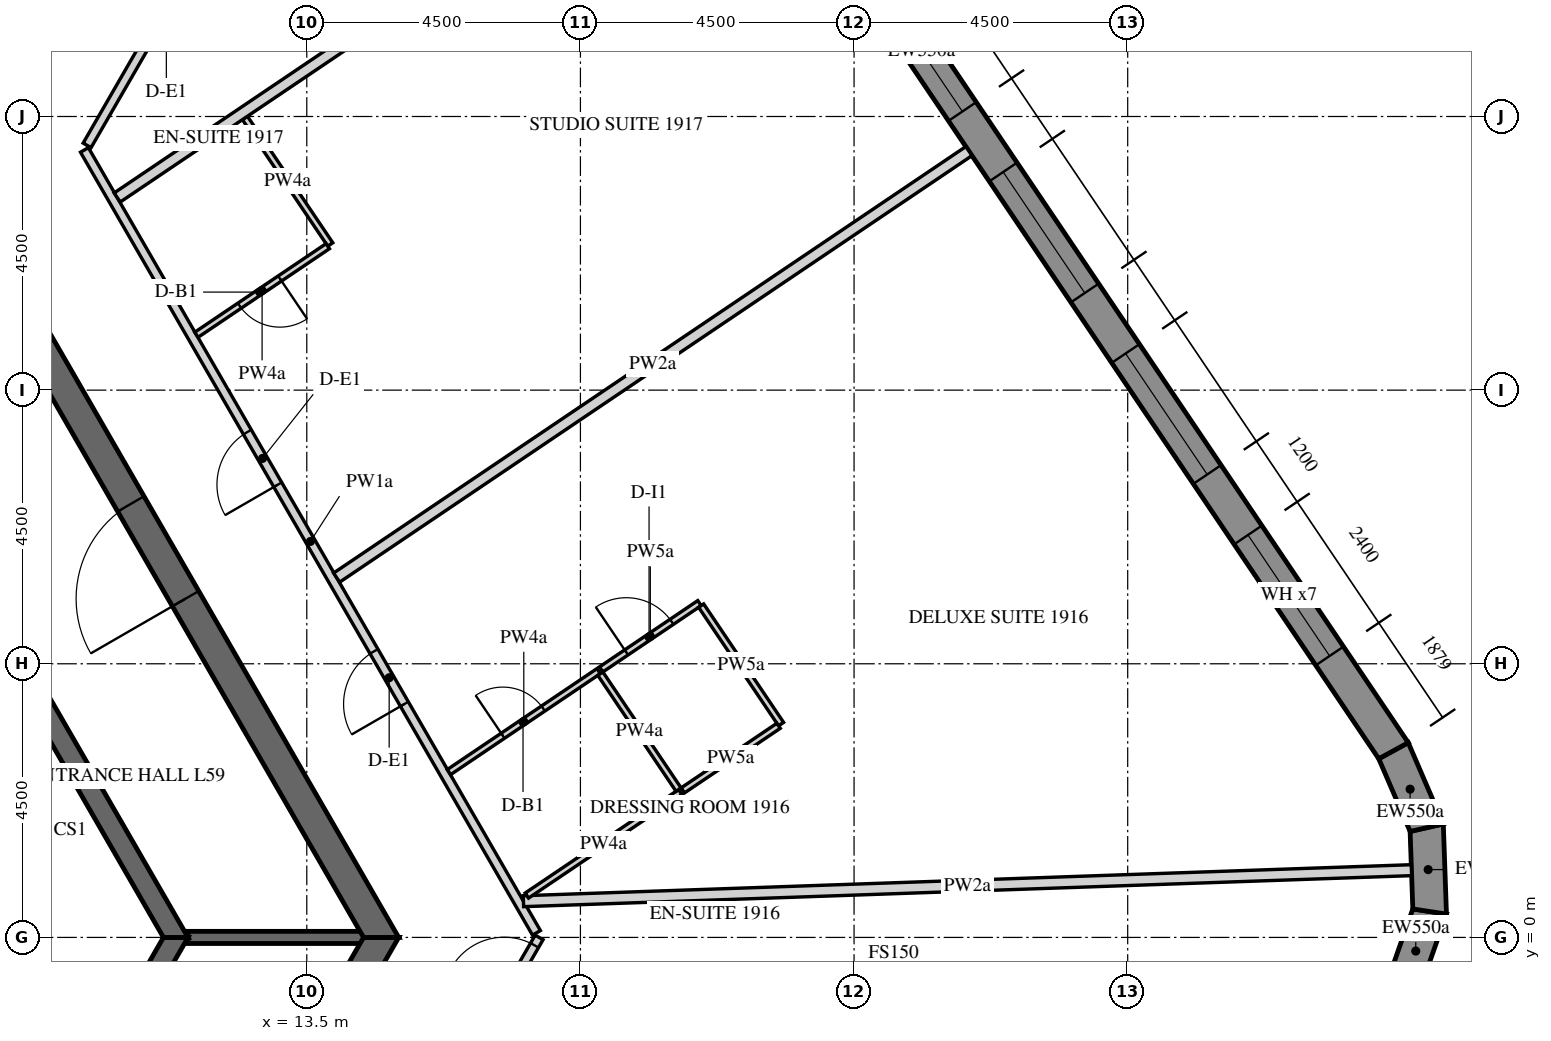
"""IFC4 building model, lengths in metres.
Left out: names, types, materials, properties, quantities, classifications, styles, units other than length and angle.
Written with IfcOpenShell. Run it as: python <this file> out.ifc"""

import sys

from ifc_helpers import new_model, si_unit, direction, frame, frame_2d, origin, place, context, subcontext, project, spatial, polyline, rectangle, outline, extrude, element, fill, save


model = new_model("IFC4")
c1 = context("Model", 3, precision=1e-05, world=origin(), true_north=direction((0.0, 1.0)))
c2 = subcontext(c1, "Body", "Model", "MODEL_VIEW")
j1 = project(units=[si_unit("LENGTHUNIT", "METRE"), si_unit("PLANEANGLEUNIT", "RADIAN")], contexts=[c1])
p1 = place(None, origin())
s1 = spatial("IfcSite", under=j1, at=p1, CompositionType="ELEMENT")
p2 = place(p1, origin())
s2 = spatial("IfcBuilding", under=s1, at=p2, CompositionType="ELEMENT")
p3 = place(p2, frame((0.0, 0.0, 246.3)))
s3 = spatial("IfcBuildingStorey", under=s2, at=p3, CompositionType="ELEMENT", Elevation=246.3)
p4 = place(p3, frame((31.509, -0.875, -0.15), z_axis=(0.0, 0.0, 1.0), x_axis=(0.33111537203, 0.943590276765, 0.0)))
e1 = element("IfcWall", 1, at=p4, inside=s3, PredefinedType="SOLIDWALL", context=c2, shape_type="SweptSolid", body=[
    extrude(outline(polyline([(-0.026, -0.275), (1.431, -0.275), (1.327, 0.275), (0.026, 0.275), (-0.026, -0.275)])), origin(), (0.0, 0.0, 1.0), 3.75),
])
p5 = place(p3, frame((31.966, 0.426, -0.15), z_axis=(0.0, 0.0, 1.0), x_axis=(-0.034876908462, 0.999391615562, 0.0)))
e2 = element("IfcWall", 2, at=p5, inside=s3, PredefinedType="SOLIDWALL", context=c2, shape_type="SweptSolid", body=[
    extrude(outline(polyline([(-0.052, -0.275), (1.431, -0.275), (1.327, 0.275), (0.052, 0.275), (-0.052, -0.275)])), origin(), (0.0, 0.0, 1.0), 3.75),
])
p6 = place(p3, frame((31.917, 1.804, -0.15), z_axis=(0.0, 0.0, 1.0), x_axis=(-0.396225741392, 0.918153125496, 0.0)))
e3 = element("IfcWall", 3, at=p6, inside=s3, PredefinedType="SOLIDWALL", context=c2, shape_type="SweptSolid", body=[
    extrude(outline(polyline([(-0.052, -0.275), (1.405, -0.275), (1.353, 0.275), (0.052, 0.275), (-0.052, -0.275)])), origin(), (0.0, 0.0, 1.0), 3.75),
])
p7 = place(p3, frame((31.371, 3.071, -0.15), z_axis=(0.0, 0.0, 1.0), x_axis=(-0.559189891278, 0.829039604297, 0.0)))
e4 = element("IfcWall", 4, at=p7, inside=s3, PredefinedType="SOLIDWALL", context=c2, shape_type="SweptSolid", body=[
    extrude(outline(polyline([(-0.026, -0.275), (27.781, -0.275), (27.736, 0.275), (0.026, 0.275), (-0.026, -0.275)])), origin(), (0.0, 0.0, 1.0), 3.75),
])
p8 = place(p7, frame((1.879, 0.0, 1.05)))
e5 = element("IfcOpeningElement", 5, at=p8, cuts=e4, PredefinedType="OPENING", context=c2, shape_type="SweptSolid", body=[
    extrude(rectangle(XDim=2.4, YDim=2.4, at=frame_2d((1.2, 1.2))), frame((0.0, 0.285, 0.0), z_axis=(0.0, -1.0, 0.0), x_axis=(1.0, 0.0, 0.0)), (0.0, 0.0, 1.0), 0.57),
])
p9 = place(p7, frame((5.479, 0.0, 1.05)))
e6 = element("IfcOpeningElement", 6, at=p9, cuts=e4, PredefinedType="OPENING", context=c2, shape_type="SweptSolid", body=[
    extrude(rectangle(XDim=2.4, YDim=2.4, at=frame_2d((1.2, 1.2))), frame((0.0, 0.285, 0.0), z_axis=(0.0, -1.0, 0.0), x_axis=(1.0, 0.0, 0.0)), (0.0, 0.0, 1.0), 0.57),
])
p10 = place(p7, frame((9.079, 0.0, 1.05)))
e7 = element("IfcOpeningElement", 7, at=p10, cuts=e4, PredefinedType="OPENING", context=c2, shape_type="SweptSolid", body=[
    extrude(rectangle(XDim=2.4, YDim=2.4, at=frame_2d((1.2, 1.2))), frame((0.0, 0.285, 0.0), z_axis=(0.0, -1.0, 0.0), x_axis=(1.0, 0.0, 0.0)), (0.0, 0.0, 1.0), 0.57),
])
p11 = place(p7, frame((12.679, 0.0, 1.05)))
e8 = element("IfcOpeningElement", 8, at=p11, cuts=e4, PredefinedType="OPENING", context=c2, shape_type="SweptSolid", body=[
    extrude(rectangle(XDim=2.4, YDim=2.4, at=frame_2d((1.2, 1.2))), frame((0.0, 0.285, 0.0), z_axis=(0.0, -1.0, 0.0), x_axis=(1.0, 0.0, 0.0)), (0.0, 0.0, 1.0), 0.57),
])
p12 = place(p7, frame((16.279, 0.0, 1.05)))
e9 = element("IfcOpeningElement", 9, at=p12, cuts=e4, PredefinedType="OPENING", context=c2, shape_type="SweptSolid", body=[
    extrude(rectangle(XDim=2.4, YDim=2.4, at=frame_2d((1.2, 1.2))), frame((0.0, 0.285, 0.0), z_axis=(0.0, -1.0, 0.0), x_axis=(1.0, 0.0, 0.0)), (0.0, 0.0, 1.0), 0.57),
])
p13 = place(p7, frame((19.879, 0.0, 1.05)))
e10 = element("IfcOpeningElement", 10, at=p13, cuts=e4, PredefinedType="OPENING", context=c2, shape_type="SweptSolid", body=[
    extrude(rectangle(XDim=2.4, YDim=2.4, at=frame_2d((1.2, 1.2))), frame((0.0, 0.285, 0.0), z_axis=(0.0, -1.0, 0.0), x_axis=(1.0, 0.0, 0.0)), (0.0, 0.0, 1.0), 0.57),
])
p14 = place(p7, frame((23.479, 0.0, 1.05)))
e11 = element("IfcOpeningElement", 11, at=p14, cuts=e4, PredefinedType="OPENING", context=c2, shape_type="SweptSolid", body=[
    extrude(rectangle(XDim=2.4, YDim=2.4, at=frame_2d((1.2, 1.2))), frame((0.0, 0.285, 0.0), z_axis=(0.0, -1.0, 0.0), x_axis=(1.0, 0.0, 0.0)), (0.0, 0.0, 1.0), 0.57),
])
p15 = place(p3, frame((7.361, -12.75, -0.15), z_axis=(0.0, 0.0, 1.0), x_axis=(0.50000571537, 0.866022103989, 0.0)))
e12 = element("IfcWall", 12, at=p15, inside=s3, PredefinedType="SHEAR", context=c2, shape_type="SweptSolid", body=[
    extrude(outline(polyline([(-0.144, -0.25), (14.867, -0.25), (14.578, 0.25), (0.144, 0.25), (-0.144, -0.25)])), origin(), (0.0, 0.0, 1.0), 3.75),
])
p16 = place(p15, frame((6.49, 0.0, 0.15)))
e13 = element("IfcOpeningElement", 13, at=p16, cuts=e12, PredefinedType="OPENING", context=c2, shape_type="SweptSolid", body=[
    extrude(rectangle(XDim=1.8, YDim=2.4, at=frame_2d((0.9, 1.2))), frame((0.0, 0.26, 0.0), z_axis=(0.0, -1.0, 0.0), x_axis=(1.0, 0.0, 0.0)), (0.0, 0.0, 1.0), 0.52),
])
p17 = place(p3, frame((14.722, 0.0, -0.15), z_axis=(0.0, 0.0, 1.0), x_axis=(-0.50000571537, 0.866022103989, 0.0)))
e14 = element("IfcWall", 14, at=p17, inside=s3, PredefinedType="SHEAR", context=c2, shape_type="SweptSolid", body=[
    extrude(outline(polyline([(-0.144, -0.25), (14.867, -0.25), (14.578, 0.25), (0.144, 0.25), (-0.144, -0.25)])), origin(), (0.0, 0.0, 1.0), 3.75),
])
p18 = place(p17, frame((6.432, 0.0, 0.15)))
e15 = element("IfcOpeningElement", 15, at=p18, cuts=e14, PredefinedType="OPENING", context=c2, shape_type="SweptSolid", body=[
    extrude(rectangle(XDim=1.8, YDim=2.4, at=frame_2d((0.9, 1.2))), frame((0.0, 0.26, 0.0), z_axis=(0.0, -1.0, 0.0), x_axis=(1.0, 0.0, 0.0)), (0.0, 0.0, 1.0), 0.52),
])
p19 = place(p3, frame((7.506, 13.0, -0.15), z_axis=(0.0, 0.0, 1.0), x_axis=(0.499988271576, 0.866032175087, 0.0)))
e16 = element("IfcWall", 16, at=p19, inside=s3, PredefinedType="SHEAR", context=c2, shape_type="SweptSolid", body=[
    extrude(rectangle(XDim=15.424, YDim=0.5, at=frame_2d((7.712, 0.0))), origin(), (0.0, 0.0, 1.0), 3.75),
])
p20 = place(p19, frame((6.812, 0.0, 0.15)))
e17 = element("IfcOpeningElement", 17, at=p20, cuts=e16, PredefinedType="OPENING", context=c2, shape_type="SweptSolid", body=[
    extrude(rectangle(XDim=1.8, YDim=2.4, at=frame_2d((0.9, 1.2))), frame((0.0, 0.26, 0.0), z_axis=(0.0, -1.0, 0.0), x_axis=(1.0, 0.0, 0.0)), (0.0, 0.0, 1.0), 0.52),
])
p21 = place(p3, frame((5.673, -9.825, -0.15), z_axis=(0.0, 0.0, 1.0), x_axis=(0.499995046907, 0.866028263435, 0.0)))
e18 = element("IfcWall", 18, at=p21, inside=s3, PredefinedType="SHEAR", context=c2, shape_type="SweptSolid", body=[
    extrude(outline(polyline([(-0.101, -0.175), (11.446, -0.175), (11.244, 0.175), (0.101, 0.175), (-0.101, -0.175)])), origin(), (0.0, 0.0, 1.0), 3.75),
])
p22 = place(p21, frame((4.801, 0.0, 0.15)))
e19 = element("IfcOpeningElement", 19, at=p22, cuts=e18, PredefinedType="OPENING", context=c2, shape_type="SweptSolid", body=[
    extrude(rectangle(XDim=1.8, YDim=2.4, at=frame_2d((0.9, 1.2))), frame((0.0, 0.185, 0.0), z_axis=(0.0, -1.0, 0.0), x_axis=(1.0, 0.0, 0.0)), (0.0, 0.0, 1.0), 0.37),
])
p23 = place(p3, frame((11.345, 0.0, -0.15), z_axis=(0.0, 0.0, 1.0), x_axis=(-0.499995046907, 0.866028263435, 0.0)))
e20 = element("IfcWall", 20, at=p23, inside=s3, PredefinedType="SHEAR", context=c2, shape_type="SweptSolid", body=[
    extrude(outline(polyline([(-0.101, -0.175), (11.446, -0.175), (11.244, 0.175), (0.101, 0.175), (-0.101, -0.175)])), origin(), (0.0, 0.0, 1.0), 3.75),
])
p24 = place(p23, frame((4.744, 0.0, 0.15)))
e21 = element("IfcOpeningElement", 21, at=p24, cuts=e20, PredefinedType="OPENING", context=c2, shape_type="SweptSolid", body=[
    extrude(rectangle(XDim=1.8, YDim=2.4, at=frame_2d((0.9, 1.2))), frame((0.0, 0.185, 0.0), z_axis=(0.0, -1.0, 0.0), x_axis=(1.0, 0.0, 0.0)), (0.0, 0.0, 1.0), 0.37),
])
p25 = place(p3, frame((11.547, 0.0, -0.15), z_axis=(0.0, 0.0, 1.0), x_axis=(1.0, 0.0, 0.0)))
e22 = element("IfcWall", 22, at=p25, inside=s3, PredefinedType="SHEAR", context=c2, shape_type="SweptSolid", body=[
    extrude(rectangle(XDim=2.887, YDim=0.2, at=frame_2d((1.443, 0.0))), origin(), (0.0, 0.0, 1.0), 3.75),
])
p26 = place(p3, frame((9.887, -12.875, 0.0), z_axis=(0.0, 0.0, 1.0), x_axis=(0.499998228944, 0.866026426302, 0.0)))
e23 = element("IfcWall", 23, at=p26, inside=s3, PredefinedType="PARTITIONING", context=c2, shape_type="SweptSolid", body=[
    extrude(rectangle(XDim=14.867, YDim=0.15, at=frame_2d((7.433, 0.0))), origin(), (0.0, 0.0, 1.0), 2.838),
])
p27 = place(p26, frame((3.519, 0.0, 0.0)))
e24 = element("IfcOpeningElement", 24, at=p27, cuts=e23, PredefinedType="OPENING", context=c2, shape_type="SweptSolid", body=[
    extrude(rectangle(XDim=1.0, YDim=2.1, at=frame_2d((0.5, 1.05))), frame((0.0, 0.085, 0.0), z_axis=(0.0, -1.0, 0.0), x_axis=(1.0, 0.0, 0.0)), (0.0, 0.0, 1.0), 0.17),
])
p28 = place(p26, frame((7.324, 0.0, 0.0)))
e25 = element("IfcOpeningElement", 25, at=p28, cuts=e23, PredefinedType="OPENING", context=c2, shape_type="SweptSolid", body=[
    extrude(rectangle(XDim=1.0, YDim=2.1, at=frame_2d((0.5, 1.05))), frame((0.0, 0.085, 0.0), z_axis=(0.0, -1.0, 0.0), x_axis=(1.0, 0.0, 0.0)), (0.0, 0.0, 1.0), 0.17),
])
p29 = place(p26, frame((13.717, 0.0, 0.0)))
e26 = element("IfcOpeningElement", 26, at=p29, cuts=e23, PredefinedType="OPENING", context=c2, shape_type="SweptSolid", body=[
    extrude(rectangle(XDim=1.0, YDim=2.1, at=frame_2d((0.5, 1.05))), frame((0.0, 0.085, 0.0), z_axis=(0.0, -1.0, 0.0), x_axis=(1.0, 0.0, 0.0)), (0.0, 0.0, 1.0), 0.17),
])
p30 = place(p3, frame((17.277, 0.075, 0.0), z_axis=(0.0, 0.0, 1.0), x_axis=(-0.499998228944, 0.866026426302, 0.0)))
e27 = element("IfcWall", 27, at=p30, inside=s3, PredefinedType="PARTITIONING", context=c2, shape_type="SweptSolid", body=[
    extrude(rectangle(XDim=14.867, YDim=0.15, at=frame_2d((7.433, 0.0))), origin(), (0.0, 0.0, 1.0), 2.838),
])
p31 = place(p30, frame((4.345, 0.0, 0.0)))
e28 = element("IfcOpeningElement", 28, at=p31, cuts=e27, PredefinedType="OPENING", context=c2, shape_type="SweptSolid", body=[
    extrude(rectangle(XDim=1.0, YDim=2.1, at=frame_2d((0.5, 1.05))), frame((0.0, 0.085, 0.0), z_axis=(0.0, -1.0, 0.0), x_axis=(1.0, 0.0, 0.0)), (0.0, 0.0, 1.0), 0.17),
])
p32 = place(p30, frame((8.51, 0.0, 0.0)))
e29 = element("IfcOpeningElement", 29, at=p32, cuts=e27, PredefinedType="OPENING", context=c2, shape_type="SweptSolid", body=[
    extrude(rectangle(XDim=1.0, YDim=2.1, at=frame_2d((0.5, 1.05))), frame((0.0, 0.085, 0.0), z_axis=(0.0, -1.0, 0.0), x_axis=(1.0, 0.0, 0.0)), (0.0, 0.0, 1.0), 0.17),
])
p33 = place(p3, frame((9.887, 13.025, 0.0), z_axis=(0.0, 0.0, 1.0), x_axis=(0.499985955615, 0.866033512162, 0.0)))
e30 = element("IfcWall", 30, at=p33, inside=s3, PredefinedType="PARTITIONING", context=c2, shape_type="SweptSolid", body=[
    extrude(rectangle(XDim=7.699, YDim=0.15, at=frame_2d((3.85, 0.0))), origin(), (0.0, 0.0, 1.0), 2.838),
])
p34 = place(p33, frame((2.106, 0.0, 0.0)))
e31 = element("IfcOpeningElement", 31, at=p34, cuts=e30, PredefinedType="OPENING", context=c2, shape_type="SweptSolid", body=[
    extrude(rectangle(XDim=1.0, YDim=2.1, at=frame_2d((0.5, 1.05))), frame((0.0, 0.085, 0.0), z_axis=(0.0, -1.0, 0.0), x_axis=(1.0, 0.0, 0.0)), (0.0, 0.0, 1.0), 0.17),
])
p35 = place(p3, frame((31.667, 1.106, 0.0), z_axis=(0.0, 0.0, 1.0), x_axis=(-0.999391305206, -0.034885800543, 0.0)))
e32 = element("IfcWall", 32, at=p35, inside=s3, PredefinedType="PARTITIONING", context=c2, shape_type="SweptSolid", body=[
    extrude(rectangle(XDim=14.612, YDim=0.18, at=frame_2d((7.306, 0.0))), origin(), (0.0, 0.0, 1.0), 2.838),
])
p36 = place(p3, frame((15.838, 2.719, 0.0), z_axis=(0.0, 0.0, 1.0), x_axis=(0.829027811096, 0.559207375156, 0.0)))
e33 = element("IfcWall", 33, at=p36, inside=s3, PredefinedType="PARTITIONING", context=c2, shape_type="SweptSolid", body=[
    extrude(rectangle(XDim=2.97, YDim=0.1, at=frame_2d((1.485, 0.0))), origin(), (0.0, 0.0, 1.0), 2.838),
])
p37 = place(p36, frame((1.07, 0.0, 0.0)))
e34 = element("IfcOpeningElement", 34, at=p37, cuts=e33, PredefinedType="OPENING", context=c2, shape_type="SweptSolid", body=[
    extrude(rectangle(XDim=0.8, YDim=2.1, at=frame_2d((0.4, 1.05))), frame((0.0, 0.06, 0.0), z_axis=(0.0, -1.0, 0.0), x_axis=(1.0, 0.0, 0.0)), (0.0, 0.0, 1.0), 0.12),
])
p38 = place(p3, frame((19.642, 2.389, 0.0), z_axis=(0.0, 0.0, 1.0), x_axis=(-0.82902628405, -0.559209639004, 0.0)))
e35 = element("IfcWall", 35, at=p38, inside=s3, PredefinedType="PARTITIONING", context=c2, shape_type="SweptSolid", body=[
    extrude(rectangle(XDim=3.043, YDim=0.1, at=frame_2d((1.521, 0.0))), origin(), (0.0, 0.0, 1.0), 2.838),
])
p39 = place(p3, frame((18.341, 4.407, 0.0), z_axis=(0.0, 0.0, 1.0), x_axis=(0.829014089772, 0.559227716552, 0.0)))
e36 = element("IfcWall", 36, at=p39, inside=s3, PredefinedType="PARTITIONING", context=c2, shape_type="SweptSolid", body=[
    extrude(rectangle(XDim=1.95, YDim=0.1, at=frame_2d((0.975, 0.0))), origin(), (0.0, 0.0, 1.0), 2.838),
])
p40 = place(p39, frame((0.5, 0.0, 0.0)))
e37 = element("IfcOpeningElement", 37, at=p40, cuts=e36, PredefinedType="OPENING", context=c2, shape_type="SweptSolid", body=[
    extrude(rectangle(XDim=0.9, YDim=2.1, at=frame_2d((0.45, 1.05))), frame((0.0, 0.06, 0.0), z_axis=(0.0, -1.0, 0.0), x_axis=(1.0, 0.0, 0.0)), (0.0, 0.0, 1.0), 0.12),
])
p41 = place(p3, frame((19.986, 5.456, 0.0), z_axis=(0.0, 0.0, 1.0), x_axis=(0.559223037199, -0.829017246302, 0.0)))
e38 = element("IfcWall", 38, at=p41, inside=s3, PredefinedType="PARTITIONING", context=c2, shape_type="SweptSolid", body=[
    extrude(rectangle(XDim=2.35, YDim=0.1, at=frame_2d((1.175, 0.0))), origin(), (0.0, 0.0, 1.0), 2.838),
])
p42 = place(p3, frame((21.258, 3.48, 0.0), z_axis=(0.0, 0.0, 1.0), x_axis=(-0.82903334026, -0.559199178055, 0.0)))
e39 = element("IfcWall", 39, at=p42, inside=s3, PredefinedType="PARTITIONING", context=c2, shape_type="SweptSolid", body=[
    extrude(rectangle(XDim=1.9, YDim=0.1, at=frame_2d((0.95, 0.0))), origin(), (0.0, 0.0, 1.0), 2.838),
])
p43 = place(p3, frame((24.389, 12.931, 0.0), z_axis=(0.0, 0.0, 1.0), x_axis=(-0.829040439793, -0.559188652593, 0.0)))
e40 = element("IfcWall", 40, at=p43, inside=s3, PredefinedType="PARTITIONING", context=c2, shape_type="SweptSolid", body=[
    extrude(rectangle(XDim=12.542, YDim=0.18, at=frame_2d((6.271, 0.0))), origin(), (0.0, 0.0, 1.0), 2.838),
])
p44 = place(p3, frame((19.614, 2.431, 0.0), z_axis=(0.0, 0.0, 1.0), x_axis=(-0.559199358977, 0.829033218225, 0.0)))
e41 = element("IfcWall", 41, at=p44, inside=s3, PredefinedType="PARTITIONING", context=c2, shape_type="SweptSolid", body=[
    extrude(rectangle(XDim=2.3, YDim=0.1, at=frame_2d((1.15, 0.0))), origin(), (0.0, 0.0, 1.0), 2.838),
])
p45 = place(p3, frame((12.483, 13.476, 0.0), z_axis=(0.0, 0.0, 1.0), x_axis=(0.559203861497, -0.829030181168, 0.0)))
e42 = element("IfcWall", 42, at=p45, inside=s3, PredefinedType="PARTITIONING", context=c2, shape_type="SweptSolid", body=[
    extrude(rectangle(XDim=2.51, YDim=0.1, at=frame_2d((1.255, 0.0))), origin(), (0.0, 0.0, 1.0), 2.838),
])
p46 = place(p3, frame((13.845, 11.367, 0.0), z_axis=(0.0, 0.0, 1.0), x_axis=(-0.829068087245, -0.55914766092, 0.0)))
e43 = element("IfcWall", 43, at=p46, inside=s3, PredefinedType="PARTITIONING", context=c2, shape_type="SweptSolid", body=[
    extrude(rectangle(XDim=2.605, YDim=0.1, at=frame_2d((1.302, 0.0))), origin(), (0.0, 0.0, 1.0), 2.838),
])
p47 = place(p46, frame((0.95, 0.0, 0.0)))
e44 = element("IfcOpeningElement", 44, at=p47, cuts=e43, PredefinedType="OPENING", context=c2, shape_type="SweptSolid", body=[
    extrude(rectangle(XDim=0.8, YDim=2.1, at=frame_2d((0.4, 1.05))), frame((0.0, 0.06, 0.0), z_axis=(0.0, -1.0, 0.0), x_axis=(1.0, 0.0, 0.0)), (0.0, 0.0, 1.0), 0.12),
])
p48 = place(p3, frame((20.363, 18.9, 0.0), z_axis=(0.0, 0.0, 1.0), x_axis=(-0.829027307641, -0.559208121531, 0.0)))
e45 = element("IfcWall", 45, at=p48, inside=s3, PredefinedType="PARTITIONING", context=c2, shape_type="SweptSolid", body=[
    extrude(rectangle(XDim=12.039, YDim=0.18, at=frame_2d((6.02, 0.0))), origin(), (0.0, 0.0, 1.0), 2.838),
])
p49 = place(p8, frame((0.0, 0.205, 0.0)))
e46 = element("IfcWindow", 46, at=p49, inside=s3, PartitioningType="DOUBLE_PANEL_VERTICAL", PredefinedType="WINDOW", context=c2, shape_type="SweptSolid", body=[
    extrude(rectangle(XDim=2.4, YDim=2.4, at=frame_2d((1.2, 1.2))), frame((0.0, 0.03, 0.0), z_axis=(0.0, -1.0, 0.0), x_axis=(1.0, 0.0, 0.0)), (0.0, 0.0, 1.0), 0.06),
])
fill(e5, e46)
p50 = place(p9, frame((0.0, 0.205, 0.0)))
e47 = element("IfcWindow", 47, at=p50, inside=s3, PartitioningType="DOUBLE_PANEL_VERTICAL", PredefinedType="WINDOW", context=c2, shape_type="SweptSolid", body=[
    extrude(rectangle(XDim=2.4, YDim=2.4, at=frame_2d((1.2, 1.2))), frame((0.0, 0.03, 0.0), z_axis=(0.0, -1.0, 0.0), x_axis=(1.0, 0.0, 0.0)), (0.0, 0.0, 1.0), 0.06),
])
fill(e6, e47)
p51 = place(p10, frame((0.0, 0.205, 0.0)))
e48 = element("IfcWindow", 48, at=p51, inside=s3, PartitioningType="DOUBLE_PANEL_VERTICAL", PredefinedType="WINDOW", context=c2, shape_type="SweptSolid", body=[
    extrude(rectangle(XDim=2.4, YDim=2.4, at=frame_2d((1.2, 1.2))), frame((0.0, 0.03, 0.0), z_axis=(0.0, -1.0, 0.0), x_axis=(1.0, 0.0, 0.0)), (0.0, 0.0, 1.0), 0.06),
])
fill(e7, e48)
p52 = place(p11, frame((0.0, 0.205, 0.0)))
e49 = element("IfcWindow", 49, at=p52, inside=s3, PartitioningType="DOUBLE_PANEL_VERTICAL", PredefinedType="WINDOW", context=c2, shape_type="SweptSolid", body=[
    extrude(rectangle(XDim=2.4, YDim=2.4, at=frame_2d((1.2, 1.2))), frame((0.0, 0.03, 0.0), z_axis=(0.0, -1.0, 0.0), x_axis=(1.0, 0.0, 0.0)), (0.0, 0.0, 1.0), 0.06),
])
fill(e8, e49)
p53 = place(p18, origin())
e50 = element("IfcDoor", 50, at=p53, inside=s3, OperationType="DOUBLE_DOOR_SINGLE_SWING", PredefinedType="DOOR", context=c2, shape_type="SweptSolid", body=[
    extrude(rectangle(XDim=1.8, YDim=2.4, at=frame_2d((0.9, 1.2))), frame((0.0, 0.025, 0.0), z_axis=(0.0, -1.0, 0.0), x_axis=(1.0, 0.0, 0.0)), (0.0, 0.0, 1.0), 0.05),
])
fill(e15, e50)
p54 = place(p29, origin())
e51 = element("IfcDoor", 51, at=p54, inside=s3, OperationType="SINGLE_SWING_LEFT", PredefinedType="DOOR", context=c2, shape_type="SweptSolid", body=[
    extrude(rectangle(XDim=1.0, YDim=2.1, at=frame_2d((0.5, 1.05))), frame((0.0, 0.025, 0.0), z_axis=(0.0, -1.0, 0.0), x_axis=(1.0, 0.0, 0.0)), (0.0, 0.0, 1.0), 0.05),
])
fill(e26, e51)
p55 = place(p31, origin())
e52 = element("IfcDoor", 52, at=p55, inside=s3, OperationType="SINGLE_SWING_LEFT", PredefinedType="DOOR", context=c2, shape_type="SweptSolid", body=[
    extrude(rectangle(XDim=1.0, YDim=2.1, at=frame_2d((0.5, 1.05))), frame((0.0, 0.025, 0.0), z_axis=(0.0, -1.0, 0.0), x_axis=(1.0, 0.0, 0.0)), (0.0, 0.0, 1.0), 0.05),
])
fill(e28, e52)
p56 = place(p37, origin())
e53 = element("IfcDoor", 53, at=p56, inside=s3, OperationType="SINGLE_SWING_RIGHT", PredefinedType="DOOR", context=c2, shape_type="SweptSolid", body=[
    extrude(rectangle(XDim=0.8, YDim=2.1, at=frame_2d((0.4, 1.05))), frame((0.0, 0.025, 0.0), z_axis=(0.0, -1.0, 0.0), x_axis=(1.0, 0.0, 0.0)), (0.0, 0.0, 1.0), 0.05),
])
fill(e34, e53)
p57 = place(p40, origin())
e54 = element("IfcDoor", 54, at=p57, inside=s3, OperationType="SINGLE_SWING_RIGHT", PredefinedType="DOOR", context=c2, shape_type="SweptSolid", body=[
    extrude(rectangle(XDim=0.9, YDim=2.1, at=frame_2d((0.45, 1.05))), frame((0.0, 0.025, 0.0), z_axis=(0.0, -1.0, 0.0), x_axis=(1.0, 0.0, 0.0)), (0.0, 0.0, 1.0), 0.05),
])
fill(e37, e54)
p58 = place(p32, origin())
e55 = element("IfcDoor", 55, at=p58, inside=s3, OperationType="SINGLE_SWING_RIGHT", PredefinedType="DOOR", context=c2, shape_type="SweptSolid", body=[
    extrude(rectangle(XDim=1.0, YDim=2.1, at=frame_2d((0.5, 1.05))), frame((0.0, 0.025, 0.0), z_axis=(0.0, -1.0, 0.0), x_axis=(1.0, 0.0, 0.0)), (0.0, 0.0, 1.0), 0.05),
])
fill(e29, e55)
p59 = place(p47, origin())
e56 = element("IfcDoor", 56, at=p59, inside=s3, OperationType="SINGLE_SWING_LEFT", PredefinedType="DOOR", context=c2, shape_type="SweptSolid", body=[
    extrude(rectangle(XDim=0.8, YDim=2.1, at=frame_2d((0.4, 1.05))), frame((0.0, 0.025, 0.0), z_axis=(0.0, -1.0, 0.0), x_axis=(1.0, 0.0, 0.0)), (0.0, 0.0, 1.0), 0.05),
])
fill(e44, e56)
save(model, sys.argv[1])
